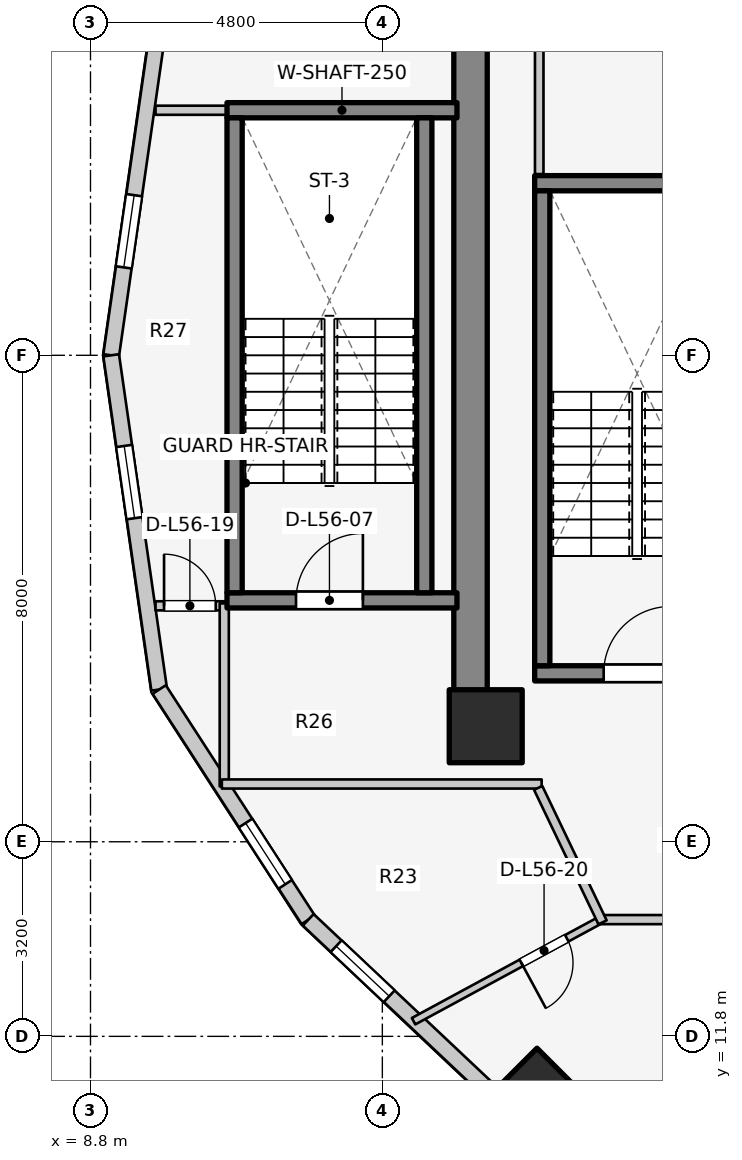
"""IFC4 building model, lengths in metres.
Left out: names, types, materials, properties, quantities, classifications, styles, units other than length and angle.
Written with IfcOpenShell. Run it as: python <this file> out.ifc"""

import sys

from ifc_helpers import new_model, si_unit, direction, frame, frame_2d, origin, origin_2d, place, context, subcontext, project, spatial, rectangle, extrude, element, fill, save


model = new_model("IFC4")
c1 = context("Model", 3, precision=1e-05, world=origin(), true_north=direction((0.0, 1.0)))
c2 = subcontext(c1, "Body", "Model", "MODEL_VIEW")
j1 = project(units=[si_unit("LENGTHUNIT", "METRE"), si_unit("PLANEANGLEUNIT", "RADIAN")], contexts=[c1])
p1 = place(None, origin())
s1 = spatial("IfcSite", under=j1, at=p1, CompositionType="ELEMENT")
p2 = place(p1, origin())
s2 = spatial("IfcBuilding", under=s1, at=p2, CompositionType="ELEMENT")
p3 = place(p2, frame((0.0, 0.0, 183.9)))
s3 = spatial("IfcBuildingStorey", under=s2, at=p3, CompositionType="ELEMENT", Elevation=183.9)
p4 = place(p3, frame((15.05, 17.05, 0.0), z_axis=(0.0, 0.0, 1.0), x_axis=(0.0, 1.0, 0.0)))
e1 = element("IfcWall", 1, at=p4, inside=s3, PredefinedType="SHEAR", context=c2, shape_type="SweptSolid", body=[
    extrude(rectangle(XDim=12.8, YDim=0.55, at=frame_2d((6.4, 0.0))), origin(), (0.0, 0.0, 1.0), 3.1),
])
p5 = place(p3, frame((16.105, 17.77, 0.0), z_axis=(0.0, 0.0, 1.0), x_axis=(1.0, 0.0, 0.0)))
e2 = element("IfcWall", 2, at=p5, inside=s3, PredefinedType="SOLIDWALL", context=c2, shape_type="SweptSolid", body=[
    extrude(rectangle(XDim=3.37, YDim=0.25, at=frame_2d((1.685, 0.0))), origin(), (0.0, 0.0, 1.0), 3.1),
])
p6 = place(p5, frame((1.135, 0.0, 0.0)))
e3 = element("IfcOpeningElement", 3, at=p6, cuts=e2, PredefinedType="OPENING", context=c2, shape_type="SweptSolid", body=[
    extrude(rectangle(XDim=1.1, YDim=2.1, at=frame_2d((0.55, 1.05))), frame((0.0, 0.135, 0.0), z_axis=(0.0, -1.0, 0.0), x_axis=(1.0, 0.0, 0.0)), (0.0, 0.0, 1.0), 0.27),
])
p7 = place(p3, frame((16.105, 25.83, 0.0), z_axis=(0.0, 0.0, 1.0), x_axis=(1.0, 0.0, 0.0)))
e4 = element("IfcWall", 4, at=p7, inside=s3, PredefinedType="SOLIDWALL", context=c2, shape_type="SweptSolid", body=[
    extrude(rectangle(XDim=3.37, YDim=0.25, at=frame_2d((1.685, 0.0))), origin(), (0.0, 0.0, 1.0), 3.1),
])
p8 = place(p3, frame((16.23, 17.895, 0.0), z_axis=(0.0, 0.0, 1.0), x_axis=(0.0, 1.0, 0.0)))
e5 = element("IfcWall", 5, at=p8, inside=s3, PredefinedType="SOLIDWALL", context=c2, shape_type="SweptSolid", body=[
    extrude(rectangle(XDim=7.81, YDim=0.25, at=frame_2d((3.905, 0.0))), origin(), (0.0, 0.0, 1.0), 3.1),
])
p9 = place(p3, frame((11.045, 18.97, 0.0), z_axis=(0.0, 0.0, 1.0), x_axis=(1.0, 0.0, 0.0)))
e6 = element("IfcWall", 6, at=p9, inside=s3, PredefinedType="SOLIDWALL", context=c2, shape_type="SweptSolid", body=[
    extrude(rectangle(XDim=3.782, YDim=0.25, at=frame_2d((1.891, 0.0))), origin(), (0.0, 0.0, 1.0), 3.1),
])
p10 = place(p9, frame((1.135, 0.0, 0.0)))
e7 = element("IfcOpeningElement", 7, at=p10, cuts=e6, PredefinedType="OPENING", context=c2, shape_type="SweptSolid", body=[
    extrude(rectangle(XDim=1.1, YDim=2.1, at=frame_2d((0.55, 1.05))), frame((0.0, 0.135, 0.0), z_axis=(0.0, -1.0, 0.0), x_axis=(1.0, 0.0, 0.0)), (0.0, 0.0, 1.0), 0.27),
])
p11 = place(p3, frame((11.045, 27.03, 0.0), z_axis=(0.0, 0.0, 1.0), x_axis=(1.0, 0.0, 0.0)))
e8 = element("IfcWall", 8, at=p11, inside=s3, PredefinedType="SOLIDWALL", context=c2, shape_type="SweptSolid", body=[
    extrude(rectangle(XDim=3.782, YDim=0.25, at=frame_2d((1.891, 0.0))), origin(), (0.0, 0.0, 1.0), 3.1),
])
for number, where, z_axis, x_axis in (
    (9, (11.17, 19.095, 0.0), (0.0, 0.0, 1.0), (0.0, 1.0, 0.0)),
    (10, (14.29, 19.095, 0.0), (0.0, 0.0, 1.0), (0.0, 1.0, 0.0)),
):
    element("IfcWall", number, at=place(p3, frame(where, z_axis=z_axis, x_axis=x_axis)), inside=s3, PredefinedType="SOLIDWALL", context=c2, shape_type="SweptSolid", body=[
        extrude(rectangle(XDim=7.81, YDim=0.25, at=frame_2d((3.905, 0.0))), origin(), (0.0, 0.0, 1.0), 3.1),
    ])
p12 = place(p3, frame((15.3, 16.9, 0.0), z_axis=(0.0, 0.0, 1.0), x_axis=(1.0, 0.0, 0.0)))
e11 = element("IfcColumn", 11, at=p12, inside=s3, PredefinedType="COLUMN", context=c2, shape_type="SweptSolid", body=[
    extrude(rectangle(XDim=1.2, YDim=1.2, at=origin_2d()), origin(), (0.0, 0.0, 1.0), 3.1),
])
p13 = place(p3, frame((16.143, 10.969, 0.0), z_axis=(0.0, 0.0, 1.0), x_axis=(-0.707106781187, -0.707106781187, 0.0)))
e12 = element("IfcColumn", 12, at=p13, inside=s3, PredefinedType="COLUMN", context=c2, shape_type="SweptSolid", body=[
    extrude(rectangle(XDim=0.9, YDim=0.9, at=origin_2d()), origin(), (0.0, 0.0, 1.0), 3.1),
])
p14 = place(p3, frame((9.93, 28.497, 0.0), z_axis=(0.0, 0.0, 1.0), x_axis=(-0.142227632286, -0.989833976288, 0.0)))
e13 = element("IfcWall", 13, at=p14, inside=s3, PredefinedType="STANDARD", context=c2, shape_type="SweptSolid", body=[
    extrude(rectangle(XDim=5.553, YDim=0.26, at=frame_2d((2.776, 0.0))), origin(), (0.0, 0.0, 1.0), 2.85),
])
p15 = place(p14, frame((2.892, 0.0, 0.75)))
e14 = element("IfcOpeningElement", 14, at=p15, cuts=e13, PredefinedType="OPENING", context=c2, shape_type="SweptSolid", body=[
    extrude(rectangle(XDim=1.2, YDim=1.5, at=frame_2d((0.6, 0.75))), frame((0.0, 0.14, 0.0), z_axis=(0.0, -1.0, 0.0), x_axis=(1.0, 0.0, 0.0)), (0.0, 0.0, 1.0), 0.28),
])
p16 = place(p3, frame((9.14, 23.0, 0.0), z_axis=(0.0, 0.0, 1.0), x_axis=(0.142227632286, -0.989833976288, 0.0)))
e15 = element("IfcWall", 15, at=p16, inside=s3, PredefinedType="STANDARD", context=c2, shape_type="SweptSolid", body=[
    extrude(rectangle(XDim=5.553, YDim=0.26, at=frame_2d((2.776, 0.0))), origin(), (0.0, 0.0, 1.0), 2.85),
])
p17 = place(p16, frame((1.506, 0.0, 0.75)))
e16 = element("IfcOpeningElement", 16, at=p17, cuts=e15, PredefinedType="OPENING", context=c2, shape_type="SweptSolid", body=[
    extrude(rectangle(XDim=1.2, YDim=1.5, at=frame_2d((0.6, 0.75))), frame((0.0, 0.14, 0.0), z_axis=(0.0, -1.0, 0.0), x_axis=(1.0, 0.0, 0.0)), (0.0, 0.0, 1.0), 0.28),
])
p18 = place(p3, frame((9.93, 17.503, 0.0), z_axis=(0.0, 0.0, 1.0), x_axis=(0.543358984534, -0.839500454989, 0.0)))
e17 = element("IfcWall", 17, at=p18, inside=s3, PredefinedType="STANDARD", context=c2, shape_type="SweptSolid", body=[
    extrude(rectangle(XDim=4.511, YDim=0.26, at=frame_2d((2.256, 0.0))), origin(), (0.0, 0.0, 1.0), 2.85),
])
p19 = place(p18, frame((2.615, 0.0, 0.75)))
e18 = element("IfcOpeningElement", 18, at=p19, cuts=e17, PredefinedType="OPENING", context=c2, shape_type="SweptSolid", body=[
    extrude(rectangle(XDim=1.2, YDim=1.5, at=frame_2d((0.6, 0.75))), frame((0.0, 0.14, 0.0), z_axis=(0.0, -1.0, 0.0), x_axis=(1.0, 0.0, 0.0)), (0.0, 0.0, 1.0), 0.28),
])
p20 = place(p3, frame((12.381, 13.716, 0.0), z_axis=(0.0, 0.0, 1.0), x_axis=(0.727667301037, -0.68593024354, 0.0)))
e19 = element("IfcWall", 19, at=p20, inside=s3, PredefinedType="STANDARD", context=c2, shape_type="SweptSolid", body=[
    extrude(rectangle(XDim=4.604, YDim=0.26, at=frame_2d((2.302, 0.0))), origin(), (0.0, 0.0, 1.0), 2.85),
])
p21 = place(p20, frame((0.631, 0.0, 0.75)))
e20 = element("IfcOpeningElement", 20, at=p21, cuts=e19, PredefinedType="OPENING", context=c2, shape_type="SweptSolid", body=[
    extrude(rectangle(XDim=1.2, YDim=1.5, at=frame_2d((0.6, 0.75))), frame((0.0, 0.14, 0.0), z_axis=(0.0, -1.0, 0.0), x_axis=(1.0, 0.0, 0.0)), (0.0, 0.0, 1.0), 0.28),
])
p22 = place(p3, frame((16.18, 25.98, 0.0), z_axis=(0.0, 0.0, 1.0), x_axis=(0.0, 1.0, 0.0)))
e21 = element("IfcWall", 21, at=p22, inside=s3, PredefinedType="PLUMBINGWALL", context=c2, shape_type="SweptSolid", body=[
    extrude(rectangle(XDim=3.88, YDim=0.14, at=frame_2d((1.94, 0.0))), origin(), (0.0, 0.0, 1.0), 2.855),
])
p23 = place(p3, frame((9.87, 27.03, 0.0), z_axis=(0.0, 0.0, 1.0), x_axis=(1.0, 0.0, 0.0)))
e22 = element("IfcWall", 22, at=p23, inside=s3, PredefinedType="PARTITIONING", context=c2, shape_type="SweptSolid", body=[
    extrude(rectangle(XDim=1.17, YDim=0.15, at=frame_2d((0.585, 0.0))), origin(), (0.0, 0.0, 1.0), 2.855),
])
p24 = place(p3, frame((9.87, 18.88, 0.0), z_axis=(0.0, 0.0, 1.0), x_axis=(1.0, 0.0, 0.0)))
e23 = element("IfcWall", 23, at=p24, inside=s3, PredefinedType="PARTITIONING", context=c2, shape_type="SweptSolid", body=[
    extrude(rectangle(XDim=1.17, YDim=0.15, at=frame_2d((0.585, 0.0))), origin(), (0.0, 0.0, 1.0), 2.855),
])
p25 = place(p24, frame((0.14, 0.0, 0.0)))
e24 = element("IfcOpeningElement", 24, at=p25, cuts=e23, PredefinedType="OPENING", context=c2, shape_type="SweptSolid", body=[
    extrude(rectangle(XDim=0.85, YDim=2.05, at=frame_2d((0.425, 1.025))), frame((0.0, 0.085, 0.0), z_axis=(0.0, -1.0, 0.0), x_axis=(1.0, 0.0, 0.0)), (0.0, 0.0, 1.0), 0.17),
])
p26 = place(p3, frame((11.0, 15.91, 0.0), z_axis=(0.0, 0.0, 1.0), x_axis=(0.0, 1.0, 0.0)))
e25 = element("IfcWall", 25, at=p26, inside=s3, PredefinedType="PARTITIONING", context=c2, shape_type="SweptSolid", body=[
    extrude(rectangle(XDim=3.01, YDim=0.15, at=frame_2d((1.505, 0.0))), origin(), (0.0, 0.0, 1.0), 2.855),
])
p27 = place(p3, frame((10.96, 15.95, 0.0), z_axis=(0.0, 0.0, 1.0), x_axis=(1.0, 0.0, 0.0)))
e26 = element("IfcWall", 26, at=p27, inside=s3, PredefinedType="PARTITIONING", context=c2, shape_type="SweptSolid", body=[
    extrude(rectangle(XDim=5.26, YDim=0.15, at=frame_2d((2.63, 0.0))), origin(), (0.0, 0.0, 1.0), 2.22),
])
p28 = place(p3, frame((17.244, 13.744, 0.0), z_axis=(0.0, 0.0, 1.0), x_axis=(-0.879385297668, -0.476110804587, 0.0)))
e27 = element("IfcWall", 27, at=p28, inside=s3, PredefinedType="MOVABLE", context=c2, shape_type="SweptSolid", body=[
    extrude(rectangle(XDim=3.56, YDim=0.12, at=frame_2d((1.78, 0.0))), origin(), (0.0, 0.0, 1.0), 2.22),
])
p29 = place(p28, frame((0.694, 0.0, 0.0)))
e28 = element("IfcOpeningElement", 28, at=p29, cuts=e27, PredefinedType="OPENING", context=c2, shape_type="SweptSolid", body=[
    extrude(rectangle(XDim=0.85, YDim=2.05, at=frame_2d((0.425, 1.025))), frame((0.0, 0.07, 0.0), z_axis=(0.0, -1.0, 0.0), x_axis=(1.0, 0.0, 0.0)), (0.0, 0.0, 1.0), 0.14),
])
p30 = place(p3, frame((17.15, 13.72, 0.0), z_axis=(0.0, 0.0, 1.0), x_axis=(1.0, 0.0, 0.0)))
e29 = element("IfcWall", 29, at=p30, inside=s3, PredefinedType="PARTITIONING", context=c2, shape_type="SweptSolid", body=[
    extrude(rectangle(XDim=7.52, YDim=0.15, at=frame_2d((3.76, 0.0))), origin(), (0.0, 0.0, 1.0), 2.299),
])
p31 = place(p30, frame((1.3, 0.0, 0.0)))
e30 = element("IfcOpeningElement", 30, at=p31, cuts=e29, PredefinedType="OPENING", context=c2, shape_type="SweptSolid", body=[
    extrude(rectangle(XDim=0.9, YDim=2.1, at=frame_2d((0.45, 1.05))), frame((0.0, 0.085, 0.0), z_axis=(0.0, -1.0, 0.0), x_axis=(1.0, 0.0, 0.0)), (0.0, 0.0, 1.0), 0.17),
])
p32 = place(p3, frame((17.222, 13.675, 0.0), z_axis=(0.0, 0.0, 1.0), x_axis=(-0.431973389813, 0.901886351207, 0.0)))
e31 = element("IfcWall", 31, at=p32, inside=s3, PredefinedType="PARTITIONING", context=c2, shape_type="SweptSolid", body=[
    extrude(rectangle(XDim=2.452, YDim=0.15, at=frame_2d((1.226, 0.0))), origin(), (0.0, 0.0, 1.0), 2.855),
])
p33 = place(p15, origin())
e32 = element("IfcWindow", 32, at=p33, inside=s3, PartitioningType="SINGLE_PANEL", PredefinedType="WINDOW", context=c2, shape_type="SweptSolid", body=[
    extrude(rectangle(XDim=1.2, YDim=1.5, at=frame_2d((0.6, 0.75))), frame((0.0, 0.03, 0.0), z_axis=(0.0, -1.0, 0.0), x_axis=(1.0, 0.0, 0.0)), (0.0, 0.0, 1.0), 0.06),
])
fill(e14, e32)
p34 = place(p17, origin())
e33 = element("IfcWindow", 33, at=p34, inside=s3, PartitioningType="SINGLE_PANEL", PredefinedType="WINDOW", context=c2, shape_type="SweptSolid", body=[
    extrude(rectangle(XDim=1.2, YDim=1.5, at=frame_2d((0.6, 0.75))), frame((0.0, 0.03, 0.0), z_axis=(0.0, -1.0, 0.0), x_axis=(1.0, 0.0, 0.0)), (0.0, 0.0, 1.0), 0.06),
])
fill(e16, e33)
p35 = place(p19, origin())
e34 = element("IfcWindow", 34, at=p35, inside=s3, PartitioningType="SINGLE_PANEL", PredefinedType="WINDOW", context=c2, shape_type="SweptSolid", body=[
    extrude(rectangle(XDim=1.2, YDim=1.5, at=frame_2d((0.6, 0.75))), frame((0.0, 0.03, 0.0), z_axis=(0.0, -1.0, 0.0), x_axis=(1.0, 0.0, 0.0)), (0.0, 0.0, 1.0), 0.06),
])
fill(e18, e34)
p36 = place(p21, origin())
e35 = element("IfcWindow", 35, at=p36, inside=s3, PartitioningType="SINGLE_PANEL", PredefinedType="WINDOW", context=c2, shape_type="SweptSolid", body=[
    extrude(rectangle(XDim=1.2, YDim=1.5, at=frame_2d((0.6, 0.75))), frame((0.0, 0.03, 0.0), z_axis=(0.0, -1.0, 0.0), x_axis=(1.0, 0.0, 0.0)), (0.0, 0.0, 1.0), 0.06),
])
fill(e20, e35)
p37 = place(p6, origin())
e36 = element("IfcDoor", 36, at=p37, inside=s3, OperationType="SINGLE_SWING_RIGHT", PredefinedType="DOOR", context=c2, shape_type="SweptSolid", body=[
    extrude(rectangle(XDim=1.1, YDim=2.1, at=frame_2d((0.55, 1.05))), frame((0.0, 0.025, 0.0), z_axis=(0.0, -1.0, 0.0), x_axis=(1.0, 0.0, 0.0)), (0.0, 0.0, 1.0), 0.05),
])
fill(e3, e36)
p38 = place(p10, origin())
e37 = element("IfcDoor", 37, at=p38, inside=s3, OperationType="SINGLE_SWING_RIGHT", PredefinedType="DOOR", context=c2, shape_type="SweptSolid", body=[
    extrude(rectangle(XDim=1.1, YDim=2.1, at=frame_2d((0.55, 1.05))), frame((0.0, 0.025, 0.0), z_axis=(0.0, -1.0, 0.0), x_axis=(1.0, 0.0, 0.0)), (0.0, 0.0, 1.0), 0.05),
])
fill(e7, e37)
p39 = place(p25, origin())
e38 = element("IfcDoor", 38, at=p39, inside=s3, OperationType="SINGLE_SWING_LEFT", PredefinedType="DOOR", context=c2, shape_type="SweptSolid", body=[
    extrude(rectangle(XDim=0.85, YDim=2.05, at=frame_2d((0.425, 1.025))), frame((0.0, 0.025, 0.0), z_axis=(0.0, -1.0, 0.0), x_axis=(1.0, 0.0, 0.0)), (0.0, 0.0, 1.0), 0.05),
])
fill(e24, e38)
p40 = place(p29, origin())
e39 = element("IfcDoor", 39, at=p40, inside=s3, OperationType="SINGLE_SWING_RIGHT", PredefinedType="DOOR", context=c2, shape_type="SweptSolid", body=[
    extrude(rectangle(XDim=0.85, YDim=2.05, at=frame_2d((0.425, 1.025))), frame((0.0, 0.025, 0.0), z_axis=(0.0, -1.0, 0.0), x_axis=(1.0, 0.0, 0.0)), (0.0, 0.0, 1.0), 0.05),
])
fill(e28, e39)
save(model, sys.argv[1])
